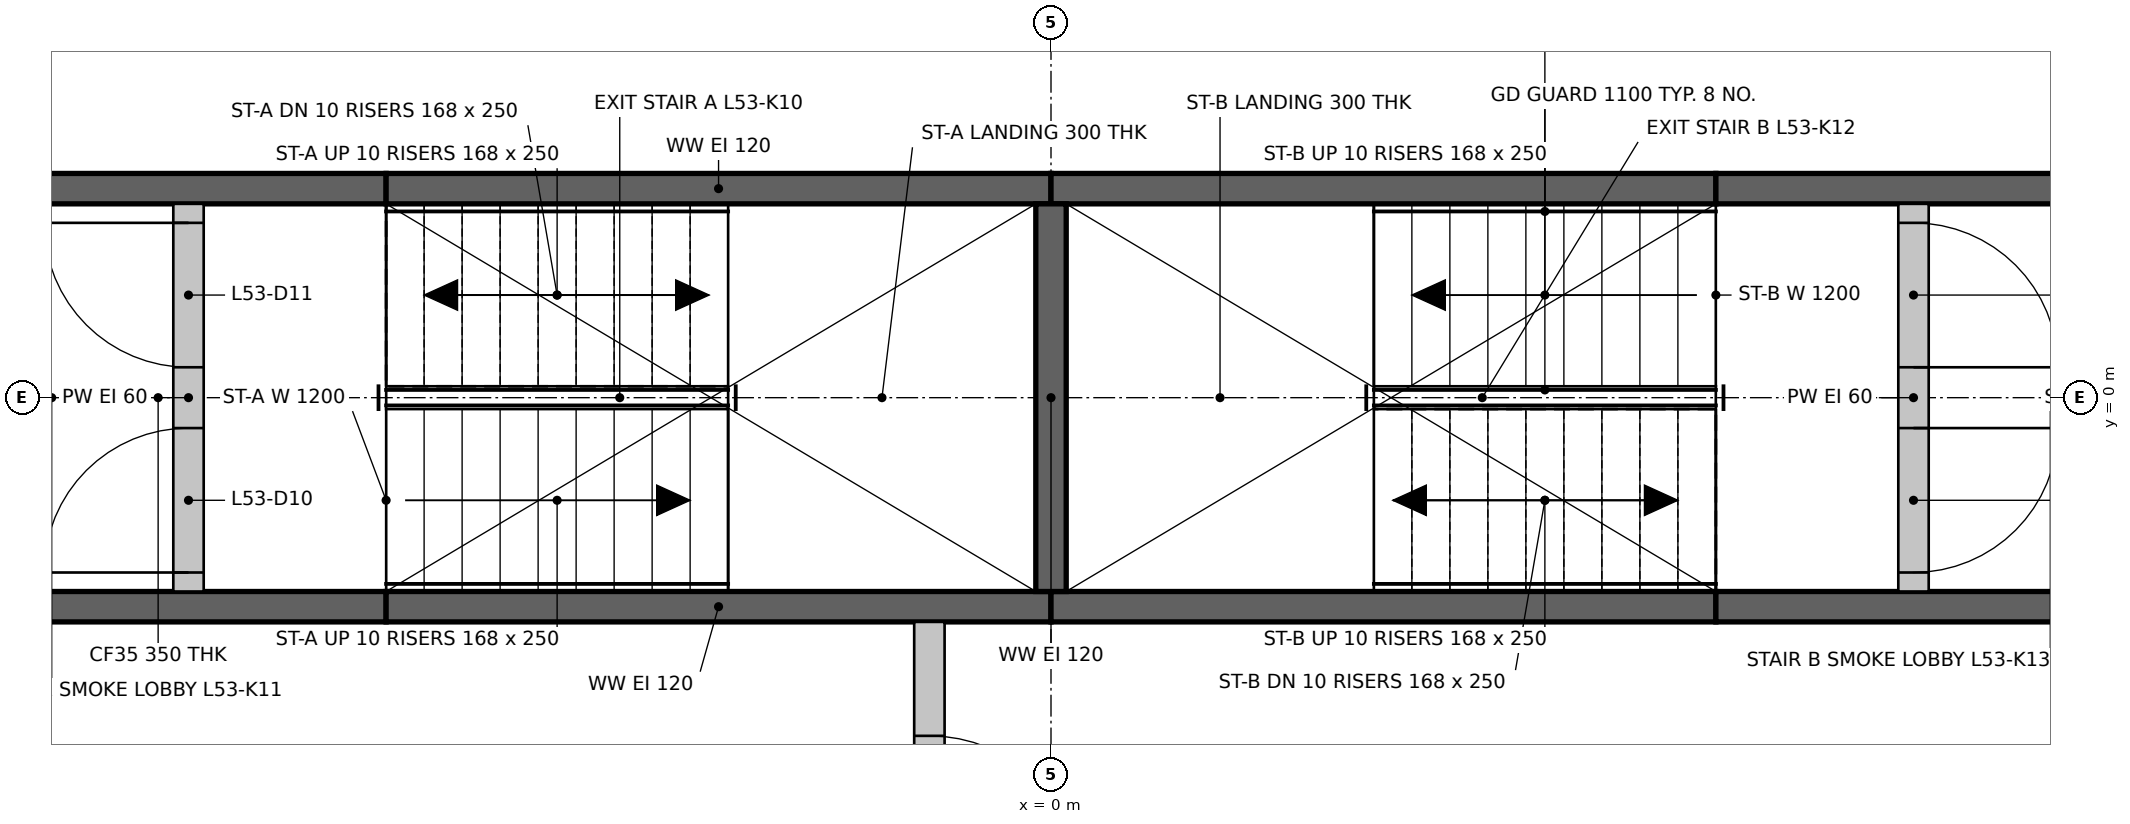
"""IFC4 building model, lengths in metres.
Left out: names, types, materials, properties, quantities, classifications, styles, units other than length and angle.
Written with IfcOpenShell. Run it as: python <this file> out.ifc"""

import sys

from ifc_helpers import new_model, si_unit, direction, frame, frame_2d, origin, place, context, subcontext, project, spatial, rectangle, extrude, element, fill, save


model = new_model("IFC4")
c1 = context("Model", 3, precision=1e-05, world=origin(), true_north=direction((0.0, 1.0)))
c2 = subcontext(c1, "Body", "Model", "MODEL_VIEW")
j1 = project(units=[si_unit("LENGTHUNIT", "METRE"), si_unit("PLANEANGLEUNIT", "RADIAN")], contexts=[c1])
p1 = place(None, origin())
s1 = spatial("IfcSite", under=j1, at=p1, CompositionType="ELEMENT")
p2 = place(p1, origin())
s2 = spatial("IfcBuilding", under=s1, at=p2, CompositionType="ELEMENT")
p3 = place(p2, frame((0.0, 0.0, 201.05)))
s3 = spatial("IfcBuildingStorey", under=s2, at=p3, CompositionType="ELEMENT", Elevation=201.05)
p4 = place(p3, frame((-7.374, -1.375, 0.0), z_axis=(0.0, 0.0, 1.0), x_axis=(1.0, 0.0, 0.0)))
e1 = element("IfcWall", 1, at=p4, inside=s3, PredefinedType="SHEAR", context=c2, shape_type="SweptSolid", body=[
    extrude(rectangle(XDim=3.0, YDim=0.2, at=frame_2d((1.5, 0.0))), origin(), (0.0, 0.0, 1.0), 3.0),
])
for number, where, z_axis, x_axis in (
    (2, (-4.374, -1.375, 0.0), (0.0, 0.0, 1.0), (1.0, 0.0, 0.0)),
    (3, (0.0, -1.375, 0.0), (0.0, 0.0, 1.0), (1.0, 0.0, 0.0)),
):
    element("IfcWall", number, at=place(p3, frame(where, z_axis=z_axis, x_axis=x_axis)), inside=s3, PredefinedType="SHEAR", context=c2, shape_type="SweptSolid", body=[
        extrude(rectangle(XDim=4.374, YDim=0.2, at=frame_2d((2.187, 0.0))), origin(), (0.0, 0.0, 1.0), 3.0),
    ])
for number, where, z_axis, x_axis in (
    (4, (4.374, -1.375, 0.0), (0.0, 0.0, 1.0), (1.0, 0.0, 0.0)),
    (5, (-7.374, 1.375, 0.0), (0.0, 0.0, 1.0), (1.0, 0.0, 0.0)),
):
    element("IfcWall", number, at=place(p3, frame(where, z_axis=z_axis, x_axis=x_axis)), inside=s3, PredefinedType="SHEAR", context=c2, shape_type="SweptSolid", body=[
        extrude(rectangle(XDim=3.0, YDim=0.2, at=frame_2d((1.5, 0.0))), origin(), (0.0, 0.0, 1.0), 3.0),
    ])
for number, where, z_axis, x_axis in (
    (6, (-4.374, 1.375, 0.0), (0.0, 0.0, 1.0), (1.0, 0.0, 0.0)),
    (7, (0.0, 1.375, 0.0), (0.0, 0.0, 1.0), (1.0, 0.0, 0.0)),
):
    element("IfcWall", number, at=place(p3, frame(where, z_axis=z_axis, x_axis=x_axis)), inside=s3, PredefinedType="SHEAR", context=c2, shape_type="SweptSolid", body=[
        extrude(rectangle(XDim=4.374, YDim=0.2, at=frame_2d((2.187, 0.0))), origin(), (0.0, 0.0, 1.0), 3.0),
    ])
p5 = place(p3, frame((4.374, 1.375, 0.0), z_axis=(0.0, 0.0, 1.0), x_axis=(1.0, 0.0, 0.0)))
e8 = element("IfcWall", 8, at=p5, inside=s3, PredefinedType="SHEAR", context=c2, shape_type="SweptSolid", body=[
    extrude(rectangle(XDim=3.0, YDim=0.2, at=frame_2d((1.5, 0.0))), origin(), (0.0, 0.0, 1.0), 3.0),
])
p6 = place(p3, frame((0.0, -1.275, 0.0), z_axis=(0.0, 0.0, 1.0), x_axis=(0.0, 1.0, 0.0)))
e9 = element("IfcWall", 9, at=p6, inside=s3, PredefinedType="SHEAR", context=c2, shape_type="SweptSolid", body=[
    extrude(rectangle(XDim=2.55, YDim=0.2, at=frame_2d((1.275, 0.0))), origin(), (0.0, 0.0, 1.0), 3.0),
])
p7 = place(p3, frame((-0.8, -3.974, 0.0), z_axis=(0.0, 0.0, 1.0), x_axis=(0.0, 1.0, 0.0)))
e10 = element("IfcWall", 10, at=p7, inside=s3, PredefinedType="PARTITIONING", context=c2, shape_type="SweptSolid", body=[
    extrude(rectangle(XDim=2.499, YDim=0.2, at=frame_2d((1.25, 0.0))), origin(), (0.0, 0.0, 1.0), 3.0),
])
p8 = place(p7, frame((0.75, 0.0, 0.0)))
e11 = element("IfcOpeningElement", 11, at=p8, cuts=e10, PredefinedType="OPENING", context=c2, shape_type="SweptSolid", body=[
    extrude(rectangle(XDim=1.0, YDim=2.1, at=frame_2d((0.5, 1.05))), frame((0.0, 0.11, 0.0), z_axis=(0.0, -1.0, 0.0), x_axis=(1.0, 0.0, 0.0)), (0.0, 0.0, 1.0), 0.22),
])
p9 = place(p3, frame((-5.674, -1.275, 0.0), z_axis=(0.0, 0.0, 1.0), x_axis=(0.0, 1.0, 0.0)))
e12 = element("IfcWall", 12, at=p9, inside=s3, PredefinedType="PARTITIONING", context=c2, shape_type="SweptSolid", body=[
    extrude(rectangle(XDim=2.55, YDim=0.2, at=frame_2d((1.275, 0.0))), origin(), (0.0, 0.0, 1.0), 3.0),
])
p10 = place(p9, frame((0.125, 0.0, 0.0)))
e13 = element("IfcOpeningElement", 13, at=p10, cuts=e12, PredefinedType="OPENING", context=c2, shape_type="SweptSolid", body=[
    extrude(rectangle(XDim=0.95, YDim=2.1, at=frame_2d((0.475, 1.05))), frame((0.0, 0.11, 0.0), z_axis=(0.0, -1.0, 0.0), x_axis=(1.0, 0.0, 0.0)), (0.0, 0.0, 1.0), 0.22),
])
p11 = place(p9, frame((1.475, 0.0, 0.0)))
e14 = element("IfcOpeningElement", 14, at=p11, cuts=e12, PredefinedType="OPENING", context=c2, shape_type="SweptSolid", body=[
    extrude(rectangle(XDim=0.95, YDim=2.1, at=frame_2d((0.475, 1.05))), frame((0.0, 0.11, 0.0), z_axis=(0.0, -1.0, 0.0), x_axis=(1.0, 0.0, 0.0)), (0.0, 0.0, 1.0), 0.22),
])
p12 = place(p3, frame((5.674, -1.275, 0.0), z_axis=(0.0, 0.0, 1.0), x_axis=(0.0, 1.0, 0.0)))
e15 = element("IfcWall", 15, at=p12, inside=s3, PredefinedType="PARTITIONING", context=c2, shape_type="SweptSolid", body=[
    extrude(rectangle(XDim=2.55, YDim=0.2, at=frame_2d((1.275, 0.0))), origin(), (0.0, 0.0, 1.0), 3.0),
])
p13 = place(p12, frame((0.125, 0.0, 0.0)))
e16 = element("IfcOpeningElement", 16, at=p13, cuts=e15, PredefinedType="OPENING", context=c2, shape_type="SweptSolid", body=[
    extrude(rectangle(XDim=0.95, YDim=2.1, at=frame_2d((0.475, 1.05))), frame((0.0, 0.11, 0.0), z_axis=(0.0, -1.0, 0.0), x_axis=(1.0, 0.0, 0.0)), (0.0, 0.0, 1.0), 0.22),
])
p14 = place(p12, frame((1.475, 0.0, 0.0)))
e17 = element("IfcOpeningElement", 17, at=p14, cuts=e15, PredefinedType="OPENING", context=c2, shape_type="SweptSolid", body=[
    extrude(rectangle(XDim=0.95, YDim=2.1, at=frame_2d((0.475, 1.05))), frame((0.0, 0.11, 0.0), z_axis=(0.0, -1.0, 0.0), x_axis=(1.0, 0.0, 0.0)), (0.0, 0.0, 1.0), 0.22),
])
p15 = place(p10, origin())
e18 = element("IfcDoor", 18, at=p15, inside=s3, OperationType="SINGLE_SWING_LEFT", PredefinedType="DOOR", context=c2, shape_type="SweptSolid", body=[
    extrude(rectangle(XDim=0.95, YDim=2.1, at=frame_2d((0.475, 1.05))), frame((0.0, 0.025, 0.0), z_axis=(0.0, -1.0, 0.0), x_axis=(1.0, 0.0, 0.0)), (0.0, 0.0, 1.0), 0.05),
])
fill(e13, e18)
p16 = place(p11, origin())
e19 = element("IfcDoor", 19, at=p16, inside=s3, OperationType="SINGLE_SWING_RIGHT", PredefinedType="DOOR", context=c2, shape_type="SweptSolid", body=[
    extrude(rectangle(XDim=0.95, YDim=2.1, at=frame_2d((0.475, 1.05))), frame((0.0, 0.025, 0.0), z_axis=(0.0, -1.0, 0.0), x_axis=(1.0, 0.0, 0.0)), (0.0, 0.0, 1.0), 0.05),
])
fill(e14, e19)
p17 = place(p13, frame((0.95, 0.0, 0.0), z_axis=(0.0, 0.0, 1.0), x_axis=(-1.0, 0.0, 0.0)))
e20 = element("IfcDoor", 20, at=p17, inside=s3, OperationType="SINGLE_SWING_RIGHT", PredefinedType="DOOR", context=c2, shape_type="SweptSolid", body=[
    extrude(rectangle(XDim=0.95, YDim=2.1, at=frame_2d((0.475, 1.05))), frame((0.0, 0.025, 0.0), z_axis=(0.0, -1.0, 0.0), x_axis=(1.0, 0.0, 0.0)), (0.0, 0.0, 1.0), 0.05),
])
fill(e16, e20)
p18 = place(p14, frame((0.95, 0.0, 0.0), z_axis=(0.0, 0.0, 1.0), x_axis=(-1.0, 0.0, 0.0)))
e21 = element("IfcDoor", 21, at=p18, inside=s3, OperationType="SINGLE_SWING_LEFT", PredefinedType="DOOR", context=c2, shape_type="SweptSolid", body=[
    extrude(rectangle(XDim=0.95, YDim=2.1, at=frame_2d((0.475, 1.05))), frame((0.0, 0.025, 0.0), z_axis=(0.0, -1.0, 0.0), x_axis=(1.0, 0.0, 0.0)), (0.0, 0.0, 1.0), 0.05),
])
fill(e17, e21)
p19 = place(p8, frame((1.0, 0.0, 0.0), z_axis=(0.0, 0.0, 1.0), x_axis=(-1.0, 0.0, 0.0)))
e22 = element("IfcDoor", 22, at=p19, inside=s3, OperationType="SINGLE_SWING_LEFT", PredefinedType="DOOR", context=c2, shape_type="SweptSolid", body=[
    extrude(rectangle(XDim=1.0, YDim=2.1, at=frame_2d((0.5, 1.05))), frame((0.0, 0.025, 0.0), z_axis=(0.0, -1.0, 0.0), x_axis=(1.0, 0.0, 0.0)), (0.0, 0.0, 1.0), 0.05),
])
fill(e11, e22)
save(model, sys.argv[1])
